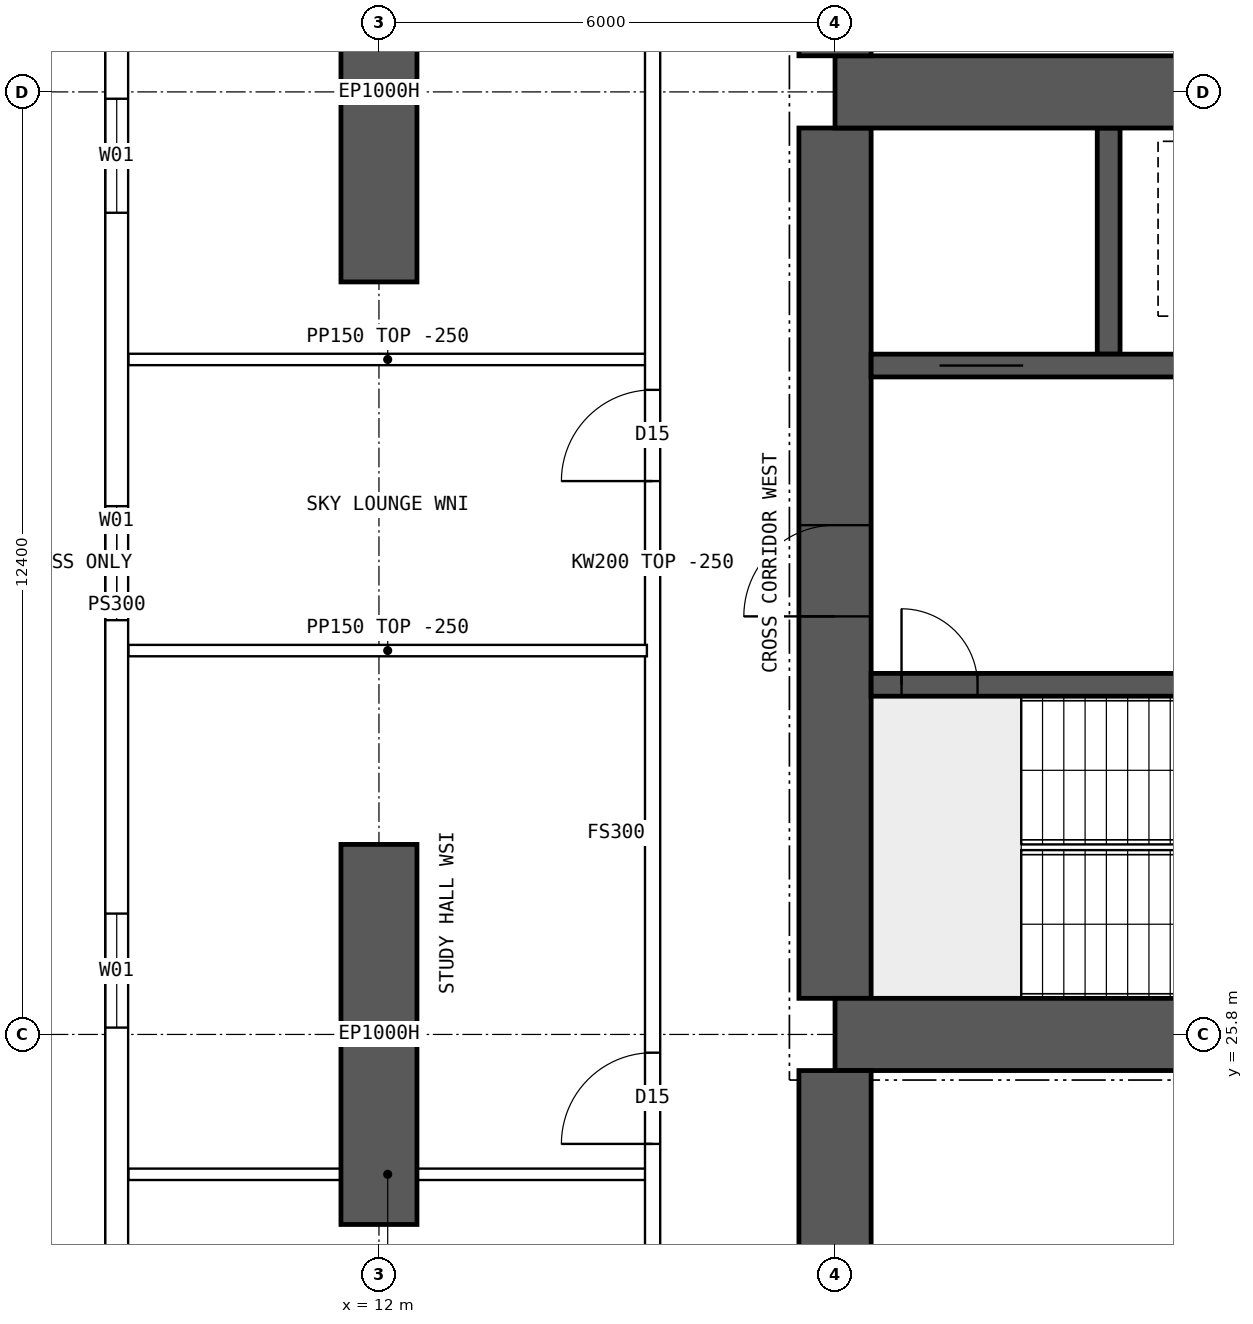
"""IFC4 building model, lengths in metres.
Left out: names, types, materials, properties, quantities, classifications, styles, units other than length and angle.
Written with IfcOpenShell. Run it as: python <this file> out.ifc"""

import sys

from ifc_helpers import new_model, si_unit, direction, frame, frame_2d, origin, place, context, subcontext, project, spatial, polyline, rectangle, outline, extrude, element, fill, save


model = new_model("IFC4")
c1 = context("Model", 3, precision=1e-05, world=origin(), true_north=direction((0.0, 1.0)))
c2 = subcontext(c1, "Body", "Model", "MODEL_VIEW")
j1 = project(units=[si_unit("LENGTHUNIT", "METRE"), si_unit("PLANEANGLEUNIT", "RADIAN")], contexts=[c1])
p1 = place(None, origin())
s1 = spatial("IfcSite", under=j1, at=p1, CompositionType="ELEMENT")
p2 = place(p1, origin())
s2 = spatial("IfcBuilding", under=s1, at=p2, CompositionType="ELEMENT")
p3 = place(p2, frame((0.0, 0.0, 140.35)))
s3 = spatial("IfcBuildingStorey", under=s2, at=p3, CompositionType="ELEMENT", Elevation=140.35)
for number, where, z_axis, x_axis in (
    (1, (12.0, 23.3, 0.0), (0.0, 0.0, 1.0), (0.0, 1.0, 0.0)),
    (2, (12.0, 35.7, 0.0), (0.0, 0.0, 1.0), (0.0, 1.0, 0.0)),
):
    element("IfcWall", number, at=place(p3, frame(where, z_axis=z_axis, x_axis=x_axis)), inside=s3, PredefinedType="SHEAR", context=c2, shape_type="SweptSolid", body=[
        extrude(rectangle(XDim=5.0, YDim=1.0, at=frame_2d((2.5, 0.0))), origin(), (0.0, 0.0, 1.0), 4.5),
    ])
for number, where, z_axis, x_axis in (
    (3, (18.0, 25.8, 0.0), (0.0, 0.0, 1.0), (1.0, 0.0, 0.0)),
    (4, (18.0, 38.2, 0.0), (0.0, 0.0, 1.0), (1.0, 0.0, 0.0)),
):
    element("IfcWall", number, at=place(p3, frame(where, z_axis=z_axis, x_axis=x_axis)), inside=s3, PredefinedType="SHEAR", context=c2, shape_type="SweptSolid", body=[
        extrude(rectangle(XDim=48.0, YDim=0.95, at=frame_2d((24.0, 0.0))), origin(), (0.0, 0.0, 1.0), 4.5),
    ])
p4 = place(p3, frame((18.0, 26.275, 0.0), z_axis=(0.0, 0.0, 1.0), x_axis=(0.0, 1.0, 0.0)))
e5 = element("IfcWall", 5, at=p4, inside=s3, PredefinedType="SHEAR", context=c2, shape_type="SweptSolid", body=[
    extrude(rectangle(XDim=11.45, YDim=0.95, at=frame_2d((5.725, 0.0))), origin(), (0.0, 0.0, 1.0), 4.5),
])
p5 = place(p4, frame((5.025, 0.0, 0.0)))
e6 = element("IfcOpeningElement", 6, at=p5, cuts=e5, PredefinedType="OPENING", context=c2, shape_type="SweptSolid", body=[
    extrude(rectangle(XDim=1.2, YDim=2.1, at=frame_2d((0.6, 1.05))), frame((0.0, 0.485, 0.0), z_axis=(0.0, -1.0, 0.0), x_axis=(1.0, 0.0, 0.0)), (0.0, 0.0, 1.0), 0.97),
])
p6 = place(p3, frame((18.475, 30.4, 0.0), z_axis=(0.0, 0.0, 1.0), x_axis=(1.0, 0.0, 0.0)))
e7 = element("IfcWall", 7, at=p6, inside=s3, PredefinedType="SHEAR", context=c2, shape_type="SweptSolid", body=[
    extrude(rectangle(XDim=47.05, YDim=0.3, at=frame_2d((23.525, 0.0))), origin(), (0.0, 0.0, 1.0), 4.5),
])
p7 = place(p6, frame((0.4, 0.0, 0.0)))
e8 = element("IfcOpeningElement", 8, at=p7, cuts=e7, PredefinedType="OPENING", context=c2, shape_type="SweptSolid", body=[
    extrude(rectangle(XDim=1.0, YDim=2.1, at=frame_2d((0.5, 1.05))), frame((0.0, 0.16, 0.0), z_axis=(0.0, -1.0, 0.0), x_axis=(1.0, 0.0, 0.0)), (0.0, 0.0, 1.0), 0.32),
])
p8 = place(p6, frame((45.65, 0.0, 0.0)))
e9 = element("IfcOpeningElement", 9, at=p8, cuts=e7, PredefinedType="OPENING", context=c2, shape_type="SweptSolid", body=[
    extrude(rectangle(XDim=1.0, YDim=2.1, at=frame_2d((0.5, 1.05))), frame((0.0, 0.16, 0.0), z_axis=(0.0, -1.0, 0.0), x_axis=(1.0, 0.0, 0.0)), (0.0, 0.0, 1.0), 0.32),
])
p9 = place(p6, frame((8.275, 0.0, 0.0)))
e10 = element("IfcOpeningElement", 10, at=p9, cuts=e7, PredefinedType="OPENING", context=c2, shape_type="SweptSolid", body=[
    extrude(rectangle(XDim=1.1, YDim=2.1, at=frame_2d((0.55, 1.05))), frame((0.0, 0.16, 0.0), z_axis=(0.0, -1.0, 0.0), x_axis=(1.0, 0.0, 0.0)), (0.0, 0.0, 1.0), 0.32),
])
p10 = place(p6, frame((10.875, 0.0, 0.0)))
e11 = element("IfcOpeningElement", 11, at=p10, cuts=e7, PredefinedType="OPENING", context=c2, shape_type="SweptSolid", body=[
    extrude(rectangle(XDim=1.1, YDim=2.1, at=frame_2d((0.55, 1.05))), frame((0.0, 0.16, 0.0), z_axis=(0.0, -1.0, 0.0), x_axis=(1.0, 0.0, 0.0)), (0.0, 0.0, 1.0), 0.32),
])
p11 = place(p6, frame((13.475, 0.0, 0.0)))
e12 = element("IfcOpeningElement", 12, at=p11, cuts=e7, PredefinedType="OPENING", context=c2, shape_type="SweptSolid", body=[
    extrude(rectangle(XDim=1.1, YDim=2.1, at=frame_2d((0.55, 1.05))), frame((0.0, 0.16, 0.0), z_axis=(0.0, -1.0, 0.0), x_axis=(1.0, 0.0, 0.0)), (0.0, 0.0, 1.0), 0.32),
])
p12 = place(p6, frame((16.075, 0.0, 0.0)))
e13 = element("IfcOpeningElement", 13, at=p12, cuts=e7, PredefinedType="OPENING", context=c2, shape_type="SweptSolid", body=[
    extrude(rectangle(XDim=1.1, YDim=2.1, at=frame_2d((0.55, 1.05))), frame((0.0, 0.16, 0.0), z_axis=(0.0, -1.0, 0.0), x_axis=(1.0, 0.0, 0.0)), (0.0, 0.0, 1.0), 0.32),
])
p13 = place(p6, frame((18.85, 0.0, 0.0)))
e14 = element("IfcOpeningElement", 14, at=p13, cuts=e7, PredefinedType="OPENING", context=c2, shape_type="SweptSolid", body=[
    extrude(rectangle(XDim=0.9, YDim=2.1, at=frame_2d((0.45, 1.05))), frame((0.0, 0.16, 0.0), z_axis=(0.0, -1.0, 0.0), x_axis=(1.0, 0.0, 0.0)), (0.0, 0.0, 1.0), 0.32),
])
p14 = place(p6, frame((21.5, 0.0, 0.0)))
e15 = element("IfcOpeningElement", 15, at=p14, cuts=e7, PredefinedType="OPENING", context=c2, shape_type="SweptSolid", body=[
    extrude(rectangle(XDim=1.1, YDim=2.1, at=frame_2d((0.55, 1.05))), frame((0.0, 0.16, 0.0), z_axis=(0.0, -1.0, 0.0), x_axis=(1.0, 0.0, 0.0)), (0.0, 0.0, 1.0), 0.32),
])
p15 = place(p6, frame((30.142, 0.0, 0.0)))
e16 = element("IfcOpeningElement", 16, at=p15, cuts=e7, PredefinedType="OPENING", context=c2, shape_type="SweptSolid", body=[
    extrude(rectangle(XDim=1.1, YDim=2.1, at=frame_2d((0.55, 1.05))), frame((0.0, 0.16, 0.0), z_axis=(0.0, -1.0, 0.0), x_axis=(1.0, 0.0, 0.0)), (0.0, 0.0, 1.0), 0.32),
])
p16 = place(p6, frame((33.675, 0.0, 0.0)))
e17 = element("IfcOpeningElement", 17, at=p16, cuts=e7, PredefinedType="OPENING", context=c2, shape_type="SweptSolid", body=[
    extrude(rectangle(XDim=1.1, YDim=2.1, at=frame_2d((0.55, 1.05))), frame((0.0, 0.16, 0.0), z_axis=(0.0, -1.0, 0.0), x_axis=(1.0, 0.0, 0.0)), (0.0, 0.0, 1.0), 0.32),
])
p17 = place(p6, frame((37.208, 0.0, 0.0)))
e18 = element("IfcOpeningElement", 18, at=p17, cuts=e7, PredefinedType="OPENING", context=c2, shape_type="SweptSolid", body=[
    extrude(rectangle(XDim=1.1, YDim=2.1, at=frame_2d((0.55, 1.05))), frame((0.0, 0.16, 0.0), z_axis=(0.0, -1.0, 0.0), x_axis=(1.0, 0.0, 0.0)), (0.0, 0.0, 1.0), 0.32),
])
p18 = place(p3, frame((18.475, 34.6, 0.0), z_axis=(0.0, 0.0, 1.0), x_axis=(1.0, 0.0, 0.0)))
e19 = element("IfcWall", 19, at=p18, inside=s3, PredefinedType="SHEAR", context=c2, shape_type="SweptSolid", body=[
    extrude(rectangle(XDim=47.05, YDim=0.3, at=frame_2d((23.525, 0.0))), origin(), (0.0, 0.0, 1.0), 4.5),
])
p19 = place(p18, frame((0.9, 0.0, 0.0)))
e20 = element("IfcOpeningElement", 20, at=p19, cuts=e19, PredefinedType="OPENING", context=c2, shape_type="SweptSolid", body=[
    extrude(rectangle(XDim=1.1, YDim=2.1, at=frame_2d((0.55, 1.05))), frame((0.0, 0.16, 0.0), z_axis=(0.0, -1.0, 0.0), x_axis=(1.0, 0.0, 0.0)), (0.0, 0.0, 1.0), 0.32),
])
p20 = place(p18, frame((45.05, 0.0, 0.0)))
e21 = element("IfcOpeningElement", 21, at=p20, cuts=e19, PredefinedType="OPENING", context=c2, shape_type="SweptSolid", body=[
    extrude(rectangle(XDim=1.1, YDim=2.1, at=frame_2d((0.55, 1.05))), frame((0.0, 0.16, 0.0), z_axis=(0.0, -1.0, 0.0), x_axis=(1.0, 0.0, 0.0)), (0.0, 0.0, 1.0), 0.32),
])
p21 = place(p18, frame((4.125, 0.0, 0.0)))
e22 = element("IfcOpeningElement", 22, at=p21, cuts=e19, PredefinedType="OPENING", context=c2, shape_type="SweptSolid", body=[
    extrude(rectangle(XDim=0.9, YDim=2.1, at=frame_2d((0.45, 1.05))), frame((0.0, 0.16, 0.0), z_axis=(0.0, -1.0, 0.0), x_axis=(1.0, 0.0, 0.0)), (0.0, 0.0, 1.0), 0.32),
])
p22 = place(p18, frame((42.025, 0.0, 0.0)))
e23 = element("IfcOpeningElement", 23, at=p22, cuts=e19, PredefinedType="OPENING", context=c2, shape_type="SweptSolid", body=[
    extrude(rectangle(XDim=0.9, YDim=2.1, at=frame_2d((0.45, 1.05))), frame((0.0, 0.16, 0.0), z_axis=(0.0, -1.0, 0.0), x_axis=(1.0, 0.0, 0.0)), (0.0, 0.0, 1.0), 0.32),
])
p23 = place(p18, frame((8.9, 0.0, 0.0)))
e24 = element("IfcOpeningElement", 24, at=p23, cuts=e19, PredefinedType="OPENING", context=c2, shape_type="SweptSolid", body=[
    extrude(rectangle(XDim=0.9, YDim=2.1, at=frame_2d((0.45, 1.05))), frame((0.0, 0.16, 0.0), z_axis=(0.0, -1.0, 0.0), x_axis=(1.0, 0.0, 0.0)), (0.0, 0.0, 1.0), 0.32),
])
p24 = place(p18, frame((12.874, 0.0, 0.0)))
e25 = element("IfcOpeningElement", 25, at=p24, cuts=e19, PredefinedType="OPENING", context=c2, shape_type="SweptSolid", body=[
    extrude(rectangle(XDim=0.9, YDim=2.1, at=frame_2d((0.45, 1.05))), frame((0.0, 0.16, 0.0), z_axis=(0.0, -1.0, 0.0), x_axis=(1.0, 0.0, 0.0)), (0.0, 0.0, 1.0), 0.32),
])
p25 = place(p18, frame((16.521, 0.0, 0.0)))
e26 = element("IfcOpeningElement", 26, at=p25, cuts=e19, PredefinedType="OPENING", context=c2, shape_type="SweptSolid", body=[
    extrude(rectangle(XDim=0.9, YDim=2.1, at=frame_2d((0.45, 1.05))), frame((0.0, 0.16, 0.0), z_axis=(0.0, -1.0, 0.0), x_axis=(1.0, 0.0, 0.0)), (0.0, 0.0, 1.0), 0.32),
])
p26 = place(p18, frame((20.28, 0.0, 0.0)))
e27 = element("IfcOpeningElement", 27, at=p26, cuts=e19, PredefinedType="OPENING", context=c2, shape_type="SweptSolid", body=[
    extrude(rectangle(XDim=0.9, YDim=2.1, at=frame_2d((0.45, 1.05))), frame((0.0, 0.16, 0.0), z_axis=(0.0, -1.0, 0.0), x_axis=(1.0, 0.0, 0.0)), (0.0, 0.0, 1.0), 0.32),
])
p27 = place(p18, frame((24.686, 0.0, 0.0)))
e28 = element("IfcOpeningElement", 28, at=p27, cuts=e19, PredefinedType="OPENING", context=c2, shape_type="SweptSolid", body=[
    extrude(rectangle(XDim=0.9, YDim=2.1, at=frame_2d((0.45, 1.05))), frame((0.0, 0.16, 0.0), z_axis=(0.0, -1.0, 0.0), x_axis=(1.0, 0.0, 0.0)), (0.0, 0.0, 1.0), 0.32),
])
p28 = place(p18, frame((27.483, 0.0, 0.0)))
e29 = element("IfcOpeningElement", 29, at=p28, cuts=e19, PredefinedType="OPENING", context=c2, shape_type="SweptSolid", body=[
    extrude(rectangle(XDim=0.9, YDim=2.1, at=frame_2d((0.45, 1.05))), frame((0.0, 0.16, 0.0), z_axis=(0.0, -1.0, 0.0), x_axis=(1.0, 0.0, 0.0)), (0.0, 0.0, 1.0), 0.32),
])
p29 = place(p18, frame((30.666, 0.0, 0.0)))
e30 = element("IfcOpeningElement", 30, at=p29, cuts=e19, PredefinedType="OPENING", context=c2, shape_type="SweptSolid", body=[
    extrude(rectangle(XDim=0.9, YDim=2.1, at=frame_2d((0.45, 1.05))), frame((0.0, 0.16, 0.0), z_axis=(0.0, -1.0, 0.0), x_axis=(1.0, 0.0, 0.0)), (0.0, 0.0, 1.0), 0.32),
])
p30 = place(p18, frame((34.617, 0.0, 0.0)))
e31 = element("IfcOpeningElement", 31, at=p30, cuts=e19, PredefinedType="OPENING", context=c2, shape_type="SweptSolid", body=[
    extrude(rectangle(XDim=0.9, YDim=2.1, at=frame_2d((0.45, 1.05))), frame((0.0, 0.16, 0.0), z_axis=(0.0, -1.0, 0.0), x_axis=(1.0, 0.0, 0.0)), (0.0, 0.0, 1.0), 0.32),
])
p31 = place(p18, frame((37.555, 0.0, 0.0)))
e32 = element("IfcOpeningElement", 32, at=p31, cuts=e19, PredefinedType="OPENING", context=c2, shape_type="SweptSolid", body=[
    extrude(rectangle(XDim=0.9, YDim=2.1, at=frame_2d((0.45, 1.05))), frame((0.0, 0.16, 0.0), z_axis=(0.0, -1.0, 0.0), x_axis=(1.0, 0.0, 0.0)), (0.0, 0.0, 1.0), 0.32),
])
p32 = place(p3, frame((21.6, 34.75, 0.0), z_axis=(0.0, 0.0, 1.0), x_axis=(0.0, 1.0, 0.0)))
e33 = element("IfcWall", 33, at=p32, inside=s3, PredefinedType="SHEAR", context=c2, shape_type="SweptSolid", body=[
    extrude(rectangle(XDim=2.975, YDim=0.3, at=frame_2d((1.488, 0.0))), origin(), (0.0, 0.0, 1.0), 4.5),
])
for number, where, z_axis, x_axis in (
    (34, (18.0, 17.2, 0.0), (0.0, 0.0, 1.0), (0.0, 1.0, 0.0)),
    (35, (18.0, 38.675, 0.0), (0.0, 0.0, 1.0), (0.0, 1.0, 0.0)),
):
    element("IfcWall", number, at=place(p3, frame(where, z_axis=z_axis, x_axis=x_axis)), inside=s3, PredefinedType="SHEAR", context=c2, shape_type="SweptSolid", body=[
        extrude(rectangle(XDim=8.125, YDim=0.95, at=frame_2d((4.062, 0.0))), origin(), (0.0, 0.0, 1.0), 4.5),
    ])
p33 = place(p3, frame((8.55, 45.4, 0.0), z_axis=(0.0, 0.0, 1.0), x_axis=(0.0, -1.0, 0.0)))
e36 = element("IfcWall", 36, at=p33, inside=s3, PredefinedType="SOLIDWALL", context=c2, shape_type="SweptSolid", body=[
    extrude(outline(polyline([(-0.015, -0.15), (26.815, -0.15), (26.785, 0.15), (0.015, 0.15), (-0.015, -0.15)])), origin(), (0.0, 0.0, 1.0), 4.25),
])
p34 = place(p33, frame((1.93, 0.0, 0.9)))
e37 = element("IfcOpeningElement", 37, at=p34, cuts=e36, PredefinedType="OPENING", context=c2, shape_type="SweptSolid", body=[
    extrude(rectangle(XDim=1.5, YDim=2.0, at=frame_2d((0.75, 1.0))), frame((0.0, 0.16, 0.0), z_axis=(0.0, -1.0, 0.0), x_axis=(1.0, 0.0, 0.0)), (0.0, 0.0, 1.0), 0.32),
])
p35 = place(p33, frame((7.29, 0.0, 0.9)))
e38 = element("IfcOpeningElement", 38, at=p35, cuts=e36, PredefinedType="OPENING", context=c2, shape_type="SweptSolid", body=[
    extrude(rectangle(XDim=1.5, YDim=2.0, at=frame_2d((0.75, 1.0))), frame((0.0, 0.16, 0.0), z_axis=(0.0, -1.0, 0.0), x_axis=(1.0, 0.0, 0.0)), (0.0, 0.0, 1.0), 0.32),
])
p36 = place(p33, frame((12.65, 0.0, 0.9)))
e39 = element("IfcOpeningElement", 39, at=p36, cuts=e36, PredefinedType="OPENING", context=c2, shape_type="SweptSolid", body=[
    extrude(rectangle(XDim=1.5, YDim=2.0, at=frame_2d((0.75, 1.0))), frame((0.0, 0.16, 0.0), z_axis=(0.0, -1.0, 0.0), x_axis=(1.0, 0.0, 0.0)), (0.0, 0.0, 1.0), 0.32),
])
p37 = place(p33, frame((18.01, 0.0, 0.9)))
e40 = element("IfcOpeningElement", 40, at=p37, cuts=e36, PredefinedType="OPENING", context=c2, shape_type="SweptSolid", body=[
    extrude(rectangle(XDim=1.5, YDim=2.0, at=frame_2d((0.75, 1.0))), frame((0.0, 0.16, 0.0), z_axis=(0.0, -1.0, 0.0), x_axis=(1.0, 0.0, 0.0)), (0.0, 0.0, 1.0), 0.32),
])
p38 = place(p33, frame((23.62, 0.0, 0.0)))
e41 = element("IfcOpeningElement", 41, at=p38, cuts=e36, PredefinedType="OPENING", context=c2, shape_type="SweptSolid", body=[
    extrude(rectangle(XDim=1.0, YDim=2.1, at=frame_2d((0.5, 1.05))), frame((0.0, 0.16, 0.0), z_axis=(0.0, -1.0, 0.0), x_axis=(1.0, 0.0, 0.0)), (0.0, 0.0, 1.0), 0.32),
])
p39 = place(p3, frame((8.705, 30.85, 0.0), z_axis=(0.0, 0.0, 1.0), x_axis=(1.0, 0.0, 0.0)))
e42 = element("IfcWall", 42, at=p39, inside=s3, PredefinedType="PARTITIONING", context=c2, shape_type="SweptSolid", body=[
    extrude(outline(polyline([(0.0, 0.0), (6.82, 0.0), (6.82, 4.25), (3.597, 4.25), (3.595, 3.8), (2.997, 3.8), (2.995, 4.25), (0.0, 4.25), (0.0, 0.0)])), frame((0.0, 0.075, 0.0), z_axis=(0.0, -1.0, 0.0), x_axis=(1.0, 0.0, 0.0)), (0.0, 0.0, 1.0), 0.15),
])
p40 = place(p3, frame((15.6, 10.446, 0.0), z_axis=(0.0, 0.0, 1.0), x_axis=(0.0, 1.0, 0.0)))
e43 = element("IfcWall", 43, at=p40, inside=s3, PredefinedType="SOLIDWALL", context=c2, shape_type="SweptSolid", body=[
    extrude(rectangle(XDim=43.107, YDim=0.2, at=frame_2d((21.554, 0.0))), origin(), (0.0, 0.0, 1.0), 4.25),
])
p41 = place(p40, frame((13.914, 0.0, 0.0)))
e44 = element("IfcOpeningElement", 44, at=p41, cuts=e43, PredefinedType="OPENING", context=c2, shape_type="SweptSolid", body=[
    extrude(rectangle(XDim=1.2, YDim=2.1, at=frame_2d((0.6, 1.05))), frame((0.0, 0.11, 0.0), z_axis=(0.0, -1.0, 0.0), x_axis=(1.0, 0.0, 0.0)), (0.0, 0.0, 1.0), 0.22),
])
p42 = place(p40, frame((22.634, 0.0, 0.0)))
e45 = element("IfcOpeningElement", 45, at=p42, cuts=e43, PredefinedType="OPENING", context=c2, shape_type="SweptSolid", body=[
    extrude(rectangle(XDim=1.2, YDim=2.1, at=frame_2d((0.6, 1.05))), frame((0.0, 0.11, 0.0), z_axis=(0.0, -1.0, 0.0), x_axis=(1.0, 0.0, 0.0)), (0.0, 0.0, 1.0), 0.22),
])
p43 = place(p40, frame((5.104, 0.0, 0.0)))
e46 = element("IfcOpeningElement", 46, at=p43, cuts=e43, PredefinedType="OPENING", context=c2, shape_type="SweptSolid", body=[
    extrude(rectangle(XDim=1.4, YDim=2.1, at=frame_2d((0.7, 1.05))), frame((0.0, 0.11, 0.0), z_axis=(0.0, -1.0, 0.0), x_axis=(1.0, 0.0, 0.0)), (0.0, 0.0, 1.0), 0.22),
])
p44 = place(p40, frame((36.504, 0.0, 0.0)))
e47 = element("IfcOpeningElement", 47, at=p44, cuts=e43, PredefinedType="OPENING", context=c2, shape_type="SweptSolid", body=[
    extrude(rectangle(XDim=1.4, YDim=2.1, at=frame_2d((0.7, 1.05))), frame((0.0, 0.11, 0.0), z_axis=(0.0, -1.0, 0.0), x_axis=(1.0, 0.0, 0.0)), (0.0, 0.0, 1.0), 0.22),
])
p45 = place(p3, frame((8.705, 23.96, 0.0), z_axis=(0.0, 0.0, 1.0), x_axis=(1.0, 0.0, 0.0)))
e48 = element("IfcWall", 48, at=p45, inside=s3, PredefinedType="PARTITIONING", context=c2, shape_type="SweptSolid", body=[
    extrude(rectangle(XDim=6.82, YDim=0.15, at=frame_2d((3.41, 0.0))), origin(), (0.0, 0.0, 1.0), 4.25),
])
p46 = place(p3, frame((8.705, 34.68, 0.0), z_axis=(0.0, 0.0, 1.0), x_axis=(1.0, 0.0, 0.0)))
e49 = element("IfcWall", 49, at=p46, inside=s3, PredefinedType="PARTITIONING", context=c2, shape_type="SweptSolid", body=[
    extrude(outline(polyline([(0.0, 0.0), (6.82, 0.0), (6.82, 4.25), (3.597, 4.25), (3.595, 3.8), (2.997, 3.8), (2.995, 4.25), (0.0, 4.25), (0.0, 0.0)])), frame((0.0, 0.075, 0.0), z_axis=(0.0, -1.0, 0.0), x_axis=(1.0, 0.0, 0.0)), (0.0, 0.0, 1.0), 0.15),
])
p47 = place(p35, origin())
e50 = element("IfcWindow", 50, at=p47, inside=s3, PartitioningType="SINGLE_PANEL", PredefinedType="WINDOW", context=c2, shape_type="SweptSolid", body=[
    extrude(rectangle(XDim=1.5, YDim=2.0, at=frame_2d((0.75, 1.0))), frame((0.0, 0.03, 0.0), z_axis=(0.0, -1.0, 0.0), x_axis=(1.0, 0.0, 0.0)), (0.0, 0.0, 1.0), 0.06),
])
fill(e38, e50)
p48 = place(p36, origin())
e51 = element("IfcWindow", 51, at=p48, inside=s3, PartitioningType="SINGLE_PANEL", PredefinedType="WINDOW", context=c2, shape_type="SweptSolid", body=[
    extrude(rectangle(XDim=1.5, YDim=2.0, at=frame_2d((0.75, 1.0))), frame((0.0, 0.03, 0.0), z_axis=(0.0, -1.0, 0.0), x_axis=(1.0, 0.0, 0.0)), (0.0, 0.0, 1.0), 0.06),
])
fill(e39, e51)
p49 = place(p37, origin())
e52 = element("IfcWindow", 52, at=p49, inside=s3, PartitioningType="SINGLE_PANEL", PredefinedType="WINDOW", context=c2, shape_type="SweptSolid", body=[
    extrude(rectangle(XDim=1.5, YDim=2.0, at=frame_2d((0.75, 1.0))), frame((0.0, 0.03, 0.0), z_axis=(0.0, -1.0, 0.0), x_axis=(1.0, 0.0, 0.0)), (0.0, 0.0, 1.0), 0.06),
])
fill(e40, e52)
p50 = place(p5, origin())
e53 = element("IfcDoor", 53, at=p50, inside=s3, OperationType="SINGLE_SWING_LEFT", PredefinedType="DOOR", context=c2, shape_type="SweptSolid", body=[
    extrude(rectangle(XDim=1.2, YDim=2.1, at=frame_2d((0.6, 1.05))), frame((0.0, 0.025, 0.0), z_axis=(0.0, -1.0, 0.0), x_axis=(1.0, 0.0, 0.0)), (0.0, 0.0, 1.0), 0.05),
])
fill(e6, e53)
p51 = place(p7, origin())
e54 = element("IfcDoor", 54, at=p51, inside=s3, OperationType="SINGLE_SWING_LEFT", PredefinedType="DOOR", context=c2, shape_type="SweptSolid", body=[
    extrude(rectangle(XDim=1.0, YDim=2.1, at=frame_2d((0.5, 1.05))), frame((0.0, 0.025, 0.0), z_axis=(0.0, -1.0, 0.0), x_axis=(1.0, 0.0, 0.0)), (0.0, 0.0, 1.0), 0.05),
])
fill(e8, e54)
p52 = place(p19, origin())
e55 = element("IfcDoor", 55, at=p52, inside=s3, OperationType="DOUBLE_DOOR_SLIDING", PredefinedType="DOOR", context=c2, shape_type="SweptSolid", body=[
    extrude(rectangle(XDim=1.1, YDim=2.1, at=frame_2d((0.55, 1.05))), frame((0.0, 0.025, 0.0), z_axis=(0.0, -1.0, 0.0), x_axis=(1.0, 0.0, 0.0)), (0.0, 0.0, 1.0), 0.05),
])
fill(e20, e55)
p53 = place(p41, origin())
e56 = element("IfcDoor", 56, at=p53, inside=s3, OperationType="SINGLE_SWING_LEFT", PredefinedType="DOOR", context=c2, shape_type="SweptSolid", body=[
    extrude(rectangle(XDim=1.2, YDim=2.1, at=frame_2d((0.6, 1.05))), frame((0.0, 0.025, 0.0), z_axis=(0.0, -1.0, 0.0), x_axis=(1.0, 0.0, 0.0)), (0.0, 0.0, 1.0), 0.05),
])
fill(e44, e56)
p54 = place(p42, origin())
e57 = element("IfcDoor", 57, at=p54, inside=s3, OperationType="SINGLE_SWING_LEFT", PredefinedType="DOOR", context=c2, shape_type="SweptSolid", body=[
    extrude(rectangle(XDim=1.2, YDim=2.1, at=frame_2d((0.6, 1.05))), frame((0.0, 0.025, 0.0), z_axis=(0.0, -1.0, 0.0), x_axis=(1.0, 0.0, 0.0)), (0.0, 0.0, 1.0), 0.05),
])
fill(e45, e57)
save(model, sys.argv[1])
